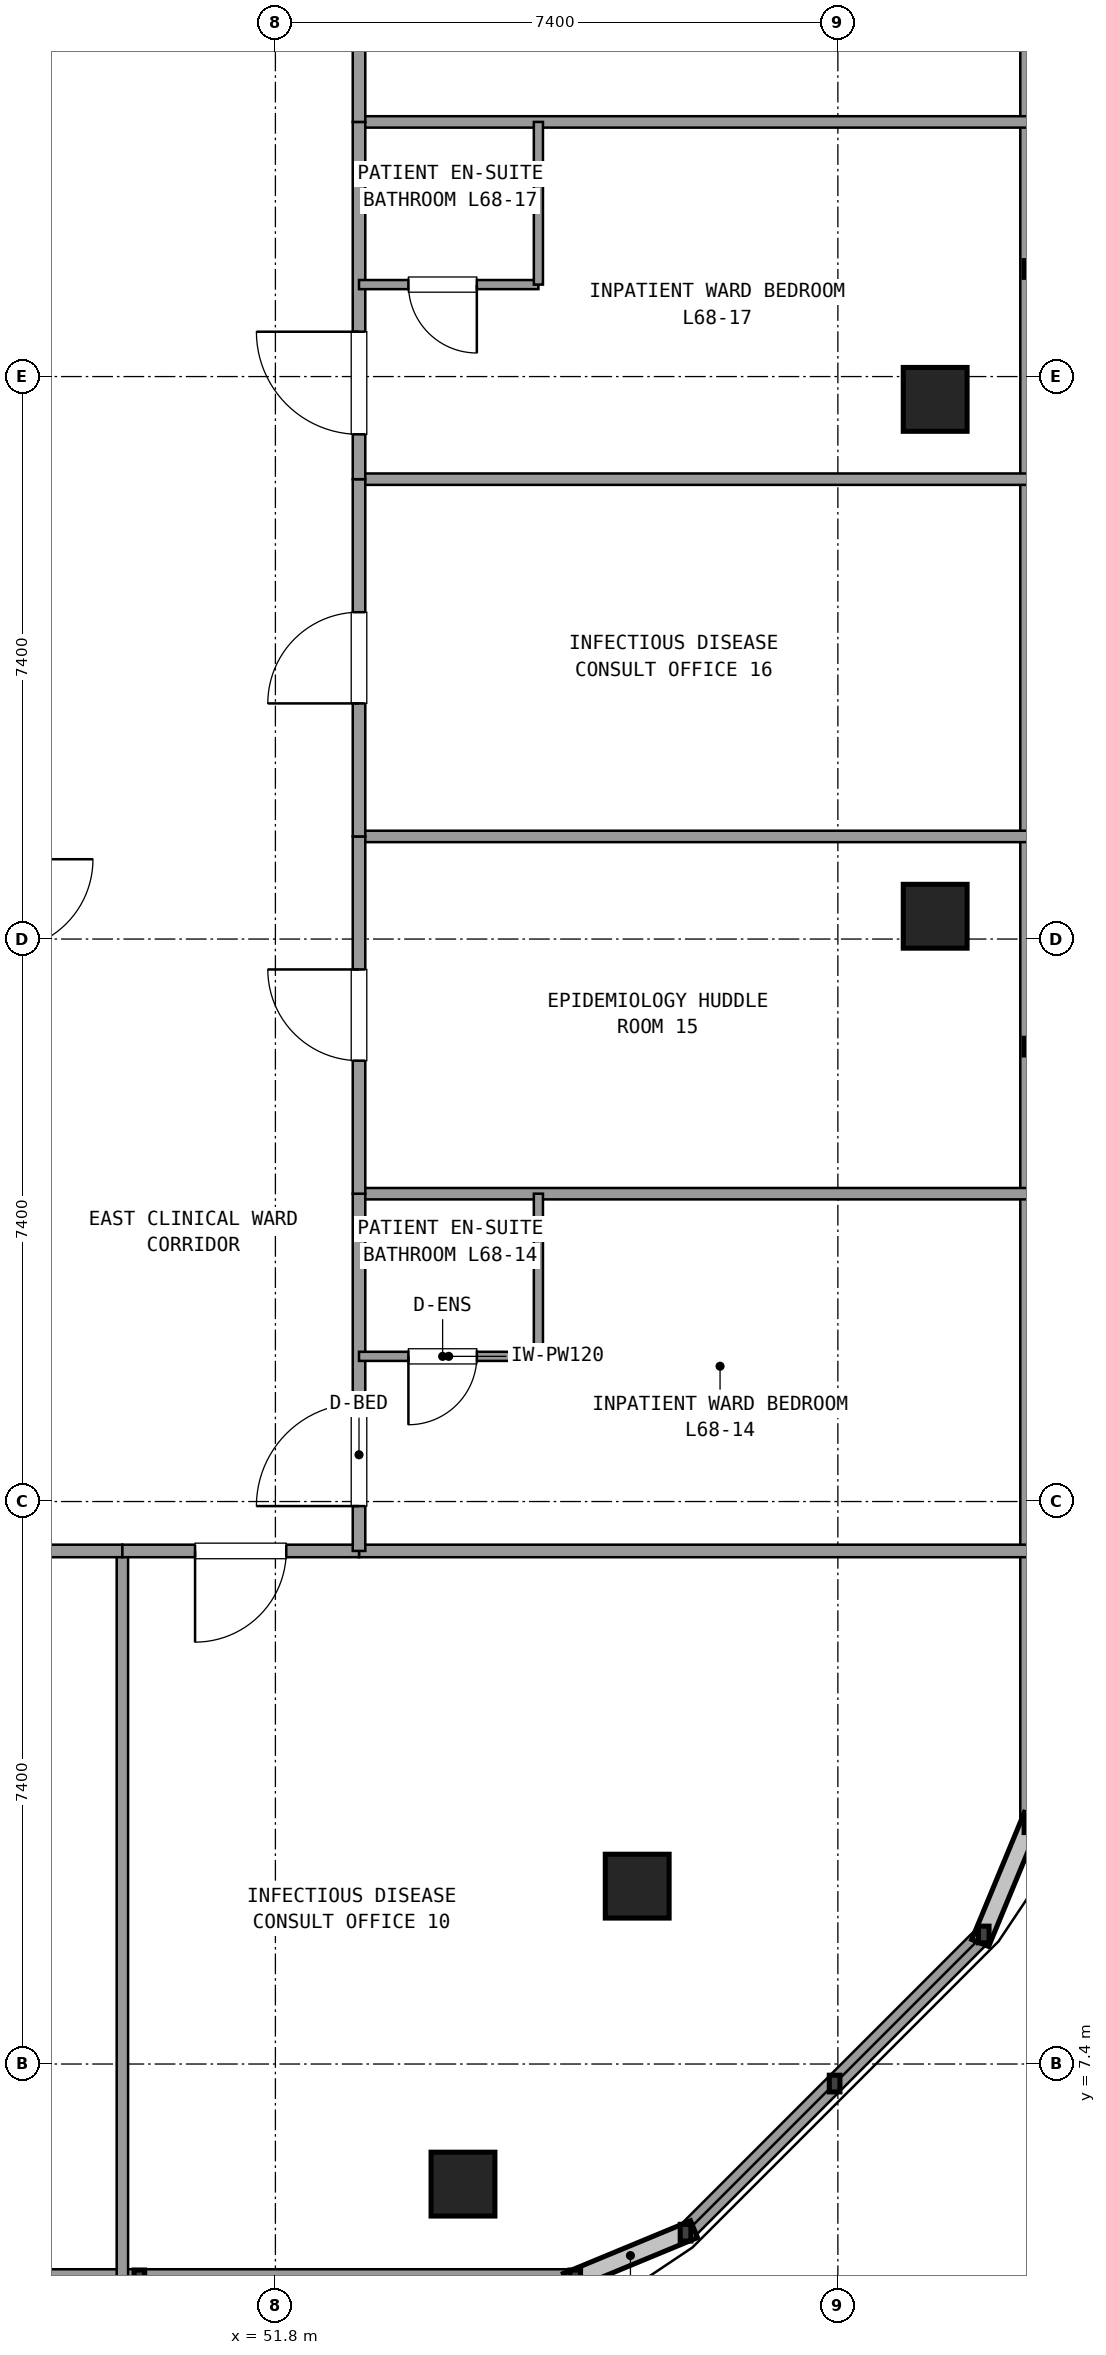
"""IFC4 building model, lengths in metres.
Left out: names, types, materials, properties, quantities, classifications, styles, units other than length and angle.
Written with IfcOpenShell. Run it as: python <this file> out.ifc"""

import sys

from ifc_helpers import new_model, si_unit, direction, frame, frame_2d, origin, origin_2d, place, context, subcontext, project, spatial, rectangle, extrude, element, fill, save


model = new_model("IFC4")
c1 = context("Model", 3, precision=1e-05, world=origin(), true_north=direction((0.0, 1.0)))
c2 = subcontext(c1, "Body", "Model", "MODEL_VIEW")
j1 = project(units=[si_unit("LENGTHUNIT", "METRE"), si_unit("PLANEANGLEUNIT", "RADIAN")], contexts=[c1])
p1 = place(None, origin())
s1 = spatial("IfcSite", under=j1, at=p1, CompositionType="ELEMENT")
p2 = place(p1, origin())
s2 = spatial("IfcBuilding", under=s1, at=p2, CompositionType="ELEMENT")
p3 = place(p2, frame((0.0, 0.0, 264.42)))
s3 = spatial("IfcBuildingStorey", under=s2, at=p3, CompositionType="ELEMENT", Elevation=264.42)
for number, where, z_axis, x_axis in (
    (1, (54.268, 5.82, 0.0), (0.0, 0.0, 1.0), (1.0, 0.0, 0.0)),
    (2, (56.56, 9.74, 0.0), (0.0, 0.0, 1.0), (1.0, 0.0, 0.0)),
    (3, (60.48, 22.5, 0.0), (0.0, 0.0, 1.0), (1.0, 0.0, 0.0)),
    (4, (60.48, 29.3, 0.0), (0.0, 0.0, 1.0), (1.0, 0.0, 0.0)),
):
    element("IfcColumn", number, at=place(p3, frame(where, z_axis=z_axis, x_axis=x_axis)), inside=s3, PredefinedType="COLUMN", context=c2, shape_type="SweptSolid", body=[
        extrude(rectangle(XDim=0.84, YDim=0.84, at=origin_2d()), origin(), (0.0, 0.0, 1.0), 3.6),
    ])
p4 = place(p3, frame((38.539, 4.58, 0.0), z_axis=(0.0, 0.0, 1.0), x_axis=(1.0, 0.0, 0.0)))
e5 = element("IfcWall", 5, at=p4, inside=s3, PredefinedType="SOLIDWALL", context=c2, shape_type="SweptSolid", body=[
    extrude(rectangle(XDim=17.206, YDim=0.24, at=frame_2d((8.603, 0.0))), origin(), (0.0, 0.0, 1.0), 0.85),
])
p5 = place(p3, frame((57.196, 5.181, 0.0), z_axis=(0.0, 0.0, 1.0), x_axis=(0.707084777957, 0.707128783731, 0.0)))
e6 = element("IfcWall", 6, at=p5, inside=s3, PredefinedType="SOLIDWALL", context=c2, shape_type="SweptSolid", body=[
    extrude(rectangle(XDim=5.548, YDim=0.24, at=frame_2d((2.774, 0.0))), origin(), (0.0, 0.0, 1.0), 0.85),
])
p6 = place(p3, frame((61.72, 10.555, 0.0), z_axis=(0.0, 0.0, 1.0), x_axis=(0.0, 1.0, 0.0)))
e7 = element("IfcWall", 7, at=p6, inside=s3, PredefinedType="SOLIDWALL", context=c2, shape_type="SweptSolid", body=[
    extrude(rectangle(XDim=30.69, YDim=0.24, at=frame_2d((15.345, 0.0))), origin(), (0.0, 0.0, 1.0), 0.85),
])
p7 = place(p3, frame((52.9, 14.15, 0.0), z_axis=(0.0, 0.0, 1.0), x_axis=(1.0, 0.0, 0.0)))
e8 = element("IfcWall", 8, at=p7, inside=s3, PredefinedType="PARTITIONING", context=c2, shape_type="SweptSolid", body=[
    extrude(rectangle(XDim=8.8, YDim=0.165, at=frame_2d((4.4, 0.0))), origin(), (0.0, 0.0, 1.0), 2.61),
])
p8 = place(p3, frame((49.787, 14.15, 0.0), z_axis=(0.0, 0.0, 1.0), x_axis=(0.0, -1.0, 0.0)))
e9 = element("IfcWall", 9, at=p8, inside=s3, PredefinedType="PARTITIONING", context=c2, shape_type="SweptSolid", body=[
    extrude(rectangle(XDim=9.55, YDim=0.15, at=frame_2d((4.775, 0.0))), origin(), (0.0, 0.0, 1.0), 2.61),
])
p9 = place(p3, frame((40.315, 14.15, 0.0), z_axis=(0.0, 0.0, 1.0), x_axis=(1.0, 0.0, 0.0)))
e10 = element("IfcWall", 10, at=p9, inside=s3, PredefinedType="PARTITIONING", context=c2, shape_type="SweptSolid", body=[
    extrude(rectangle(XDim=9.472, YDim=0.165, at=frame_2d((4.736, 0.0))), origin(), (0.0, 0.0, 1.0), 2.61),
])
p10 = place(p9, frame((4.136, 0.0, 0.0)))
e11 = element("IfcOpeningElement", 11, at=p10, cuts=e10, PredefinedType="OPENING", context=c2, shape_type="SweptSolid", body=[
    extrude(rectangle(XDim=1.2, YDim=2.15, at=frame_2d((0.6, 1.075))), frame((0.0, 0.093, 0.0), z_axis=(0.0, -1.0, 0.0), x_axis=(1.0, 0.0, 0.0)), (0.0, 0.0, 1.0), 0.185),
])
p11 = place(p3, frame((49.787, 14.15, 0.0), z_axis=(0.0, 0.0, 1.0), x_axis=(1.0, 0.0, 0.0)))
e12 = element("IfcWall", 12, at=p11, inside=s3, PredefinedType="PARTITIONING", context=c2, shape_type="SweptSolid", body=[
    extrude(rectangle(XDim=3.113, YDim=0.165, at=frame_2d((1.556, 0.0))), origin(), (0.0, 0.0, 1.0), 2.61),
])
p12 = place(p11, frame((0.956, 0.0, 0.0)))
e13 = element("IfcOpeningElement", 13, at=p12, cuts=e12, PredefinedType="OPENING", context=c2, shape_type="SweptSolid", body=[
    extrude(rectangle(XDim=1.2, YDim=2.15, at=frame_2d((0.6, 1.075))), frame((0.0, 0.093, 0.0), z_axis=(0.0, -1.0, 0.0), x_axis=(1.0, 0.0, 0.0)), (0.0, 0.0, 1.0), 0.185),
])
p13 = place(p3, frame((52.9, 18.85, 0.0), z_axis=(0.0, 0.0, 1.0), x_axis=(1.0, 0.0, 0.0)))
e14 = element("IfcWall", 14, at=p13, inside=s3, PredefinedType="PARTITIONING", context=c2, shape_type="SweptSolid", body=[
    extrude(rectangle(XDim=8.8, YDim=0.15, at=frame_2d((4.4, 0.0))), origin(), (0.0, 0.0, 1.0), 2.61),
])
p14 = place(p3, frame((52.9, 14.15, 0.0), z_axis=(0.0, 0.0, 1.0), x_axis=(0.0, 1.0, 0.0)))
e15 = element("IfcWall", 15, at=p14, inside=s3, PredefinedType="PARTITIONING", context=c2, shape_type="SweptSolid", body=[
    extrude(rectangle(XDim=4.7, YDim=0.165, at=frame_2d((2.35, 0.0))), origin(), (0.0, 0.0, 1.0), 2.61),
])
p15 = place(p14, frame((0.59, 0.0, 0.0)))
e16 = element("IfcOpeningElement", 16, at=p15, cuts=e15, PredefinedType="OPENING", context=c2, shape_type="SweptSolid", body=[
    extrude(rectangle(XDim=1.35, YDim=2.15, at=frame_2d((0.675, 1.075))), frame((0.0, 0.093, 0.0), z_axis=(0.0, -1.0, 0.0), x_axis=(1.0, 0.0, 0.0)), (0.0, 0.0, 1.0), 0.185),
])
p16 = place(p3, frame((52.9, 16.71, 0.0), z_axis=(0.0, 0.0, 1.0), x_axis=(1.0, 0.0, 0.0)))
e17 = element("IfcWall", 17, at=p16, inside=s3, PredefinedType="PLUMBINGWALL", context=c2, shape_type="SweptSolid", body=[
    extrude(rectangle(XDim=2.36, YDim=0.12, at=frame_2d((1.18, 0.0))), origin(), (0.0, 0.0, 1.0), 2.61),
])
p17 = place(p16, frame((0.65, 0.0, 0.0)))
e18 = element("IfcOpeningElement", 18, at=p17, cuts=e17, PredefinedType="OPENING", context=c2, shape_type="SweptSolid", body=[
    extrude(rectangle(XDim=0.9, YDim=2.1, at=frame_2d((0.45, 1.05))), frame((0.0, 0.07, 0.0), z_axis=(0.0, -1.0, 0.0), x_axis=(1.0, 0.0, 0.0)), (0.0, 0.0, 1.0), 0.14),
])
p18 = place(p3, frame((55.26, 16.71, 0.0), z_axis=(0.0, 0.0, 1.0), x_axis=(0.0, 1.0, 0.0)))
e19 = element("IfcWall", 19, at=p18, inside=s3, PredefinedType="PLUMBINGWALL", context=c2, shape_type="SweptSolid", body=[
    extrude(rectangle(XDim=2.14, YDim=0.12, at=frame_2d((1.07, 0.0))), origin(), (0.0, 0.0, 1.0), 2.61),
])
p19 = place(p3, frame((52.9, 23.55, 0.0), z_axis=(0.0, 0.0, 1.0), x_axis=(1.0, 0.0, 0.0)))
e20 = element("IfcWall", 20, at=p19, inside=s3, PredefinedType="PARTITIONING", context=c2, shape_type="SweptSolid", body=[
    extrude(rectangle(XDim=8.8, YDim=0.15, at=frame_2d((4.4, 0.0))), origin(), (0.0, 0.0, 1.0), 2.61),
])
p20 = place(p3, frame((52.9, 18.85, 0.0), z_axis=(0.0, 0.0, 1.0), x_axis=(0.0, 1.0, 0.0)))
e21 = element("IfcWall", 21, at=p20, inside=s3, PredefinedType="PARTITIONING", context=c2, shape_type="SweptSolid", body=[
    extrude(rectangle(XDim=4.7, YDim=0.165, at=frame_2d((2.35, 0.0))), origin(), (0.0, 0.0, 1.0), 2.61),
])
p21 = place(p20, frame((1.75, 0.0, 0.0)))
e22 = element("IfcOpeningElement", 22, at=p21, cuts=e21, PredefinedType="OPENING", context=c2, shape_type="SweptSolid", body=[
    extrude(rectangle(XDim=1.2, YDim=2.15, at=frame_2d((0.6, 1.075))), frame((0.0, 0.093, 0.0), z_axis=(0.0, -1.0, 0.0), x_axis=(1.0, 0.0, 0.0)), (0.0, 0.0, 1.0), 0.185),
])
p22 = place(p3, frame((52.9, 28.25, 0.0), z_axis=(0.0, 0.0, 1.0), x_axis=(1.0, 0.0, 0.0)))
e23 = element("IfcWall", 23, at=p22, inside=s3, PredefinedType="PARTITIONING", context=c2, shape_type="SweptSolid", body=[
    extrude(rectangle(XDim=8.8, YDim=0.15, at=frame_2d((4.4, 0.0))), origin(), (0.0, 0.0, 1.0), 2.61),
])
p23 = place(p3, frame((52.9, 23.55, 0.0), z_axis=(0.0, 0.0, 1.0), x_axis=(0.0, 1.0, 0.0)))
e24 = element("IfcWall", 24, at=p23, inside=s3, PredefinedType="PARTITIONING", context=c2, shape_type="SweptSolid", body=[
    extrude(rectangle(XDim=4.7, YDim=0.165, at=frame_2d((2.35, 0.0))), origin(), (0.0, 0.0, 1.0), 2.61),
])
p24 = place(p23, frame((1.75, 0.0, 0.0)))
e25 = element("IfcOpeningElement", 25, at=p24, cuts=e24, PredefinedType="OPENING", context=c2, shape_type="SweptSolid", body=[
    extrude(rectangle(XDim=1.2, YDim=2.15, at=frame_2d((0.6, 1.075))), frame((0.0, 0.093, 0.0), z_axis=(0.0, -1.0, 0.0), x_axis=(1.0, 0.0, 0.0)), (0.0, 0.0, 1.0), 0.185),
])
p25 = place(p3, frame((52.9, 32.95, 0.0), z_axis=(0.0, 0.0, 1.0), x_axis=(1.0, 0.0, 0.0)))
e26 = element("IfcWall", 26, at=p25, inside=s3, PredefinedType="PARTITIONING", context=c2, shape_type="SweptSolid", body=[
    extrude(rectangle(XDim=8.8, YDim=0.15, at=frame_2d((4.4, 0.0))), origin(), (0.0, 0.0, 1.0), 2.61),
])
p26 = place(p3, frame((52.9, 28.25, 0.0), z_axis=(0.0, 0.0, 1.0), x_axis=(0.0, 1.0, 0.0)))
e27 = element("IfcWall", 27, at=p26, inside=s3, PredefinedType="PARTITIONING", context=c2, shape_type="SweptSolid", body=[
    extrude(rectangle(XDim=4.7, YDim=0.165, at=frame_2d((2.35, 0.0))), origin(), (0.0, 0.0, 1.0), 2.61),
])
p27 = place(p26, frame((0.59, 0.0, 0.0)))
e28 = element("IfcOpeningElement", 28, at=p27, cuts=e27, PredefinedType="OPENING", context=c2, shape_type="SweptSolid", body=[
    extrude(rectangle(XDim=1.35, YDim=2.15, at=frame_2d((0.675, 1.075))), frame((0.0, 0.093, 0.0), z_axis=(0.0, -1.0, 0.0), x_axis=(1.0, 0.0, 0.0)), (0.0, 0.0, 1.0), 0.185),
])
p28 = place(p3, frame((52.9, 30.81, 0.0), z_axis=(0.0, 0.0, 1.0), x_axis=(1.0, 0.0, 0.0)))
e29 = element("IfcWall", 29, at=p28, inside=s3, PredefinedType="PLUMBINGWALL", context=c2, shape_type="SweptSolid", body=[
    extrude(rectangle(XDim=2.36, YDim=0.12, at=frame_2d((1.18, 0.0))), origin(), (0.0, 0.0, 1.0), 2.61),
])
p29 = place(p28, frame((0.65, 0.0, 0.0)))
e30 = element("IfcOpeningElement", 30, at=p29, cuts=e29, PredefinedType="OPENING", context=c2, shape_type="SweptSolid", body=[
    extrude(rectangle(XDim=0.9, YDim=2.1, at=frame_2d((0.45, 1.05))), frame((0.0, 0.07, 0.0), z_axis=(0.0, -1.0, 0.0), x_axis=(1.0, 0.0, 0.0)), (0.0, 0.0, 1.0), 0.14),
])
p30 = place(p3, frame((55.26, 30.81, 0.0), z_axis=(0.0, 0.0, 1.0), x_axis=(0.0, 1.0, 0.0)))
e31 = element("IfcWall", 31, at=p30, inside=s3, PredefinedType="PLUMBINGWALL", context=c2, shape_type="SweptSolid", body=[
    extrude(rectangle(XDim=2.14, YDim=0.12, at=frame_2d((1.07, 0.0))), origin(), (0.0, 0.0, 1.0), 2.61),
])
p31 = place(p3, frame((52.9, 32.95, 0.0), z_axis=(0.0, 0.0, 1.0), x_axis=(0.0, 1.0, 0.0)))
e32 = element("IfcWall", 32, at=p31, inside=s3, PredefinedType="PARTITIONING", context=c2, shape_type="SweptSolid", body=[
    extrude(rectangle(XDim=4.7, YDim=0.165, at=frame_2d((2.35, 0.0))), origin(), (0.0, 0.0, 1.0), 2.61),
])
p32 = place(p31, frame((1.75, 0.0, 0.0)))
e33 = element("IfcOpeningElement", 33, at=p32, cuts=e32, PredefinedType="OPENING", context=c2, shape_type="SweptSolid", body=[
    extrude(rectangle(XDim=1.2, YDim=2.15, at=frame_2d((0.6, 1.075))), frame((0.0, 0.093, 0.0), z_axis=(0.0, -1.0, 0.0), x_axis=(1.0, 0.0, 0.0)), (0.0, 0.0, 1.0), 0.185),
])
p33 = place(p12, frame((1.2, 0.0, 0.0), z_axis=(0.0, 0.0, 1.0), x_axis=(-1.0, 0.0, 0.0)))
e34 = element("IfcDoor", 34, at=p33, inside=s3, OperationType="SINGLE_SWING_LEFT", PredefinedType="DOOR", context=c2, shape_type="SweptSolid", body=[
    extrude(rectangle(XDim=1.2, YDim=2.15, at=frame_2d((0.6, 1.075))), frame((0.0, 0.025, 0.0), z_axis=(0.0, -1.0, 0.0), x_axis=(1.0, 0.0, 0.0)), (0.0, 0.0, 1.0), 0.05),
])
fill(e13, e34)
p34 = place(p17, frame((0.9, 0.0, 0.0), z_axis=(0.0, 0.0, 1.0), x_axis=(-1.0, 0.0, 0.0)))
e35 = element("IfcDoor", 35, at=p34, inside=s3, OperationType="SINGLE_SWING_LEFT", PredefinedType="DOOR", context=c2, shape_type="SweptSolid", body=[
    extrude(rectangle(XDim=0.9, YDim=2.1, at=frame_2d((0.45, 1.05))), frame((0.0, 0.025, 0.0), z_axis=(0.0, -1.0, 0.0), x_axis=(1.0, 0.0, 0.0)), (0.0, 0.0, 1.0), 0.05),
])
fill(e18, e35)
p35 = place(p15, origin())
e36 = element("IfcDoor", 36, at=p35, inside=s3, OperationType="SINGLE_SWING_LEFT", PredefinedType="DOOR", context=c2, shape_type="SweptSolid", body=[
    extrude(rectangle(XDim=1.35, YDim=2.15, at=frame_2d((0.675, 1.075))), frame((0.0, 0.025, 0.0), z_axis=(0.0, -1.0, 0.0), x_axis=(1.0, 0.0, 0.0)), (0.0, 0.0, 1.0), 0.05),
])
fill(e16, e36)
p36 = place(p21, origin())
e37 = element("IfcDoor", 37, at=p36, inside=s3, OperationType="SINGLE_SWING_RIGHT", PredefinedType="DOOR", context=c2, shape_type="SweptSolid", body=[
    extrude(rectangle(XDim=1.2, YDim=2.15, at=frame_2d((0.6, 1.075))), frame((0.0, 0.025, 0.0), z_axis=(0.0, -1.0, 0.0), x_axis=(1.0, 0.0, 0.0)), (0.0, 0.0, 1.0), 0.05),
])
fill(e22, e37)
p37 = place(p24, origin())
e38 = element("IfcDoor", 38, at=p37, inside=s3, OperationType="SINGLE_SWING_LEFT", PredefinedType="DOOR", context=c2, shape_type="SweptSolid", body=[
    extrude(rectangle(XDim=1.2, YDim=2.15, at=frame_2d((0.6, 1.075))), frame((0.0, 0.025, 0.0), z_axis=(0.0, -1.0, 0.0), x_axis=(1.0, 0.0, 0.0)), (0.0, 0.0, 1.0), 0.05),
])
fill(e25, e38)
p38 = place(p29, frame((0.9, 0.0, 0.0), z_axis=(0.0, 0.0, 1.0), x_axis=(-1.0, 0.0, 0.0)))
e39 = element("IfcDoor", 39, at=p38, inside=s3, OperationType="SINGLE_SWING_RIGHT", PredefinedType="DOOR", context=c2, shape_type="SweptSolid", body=[
    extrude(rectangle(XDim=0.9, YDim=2.1, at=frame_2d((0.45, 1.05))), frame((0.0, 0.025, 0.0), z_axis=(0.0, -1.0, 0.0), x_axis=(1.0, 0.0, 0.0)), (0.0, 0.0, 1.0), 0.05),
])
fill(e30, e39)
p39 = place(p27, origin())
e40 = element("IfcDoor", 40, at=p39, inside=s3, OperationType="SINGLE_SWING_RIGHT", PredefinedType="DOOR", context=c2, shape_type="SweptSolid", body=[
    extrude(rectangle(XDim=1.35, YDim=2.15, at=frame_2d((0.675, 1.075))), frame((0.0, 0.025, 0.0), z_axis=(0.0, -1.0, 0.0), x_axis=(1.0, 0.0, 0.0)), (0.0, 0.0, 1.0), 0.05),
])
fill(e28, e40)
save(model, sys.argv[1])
